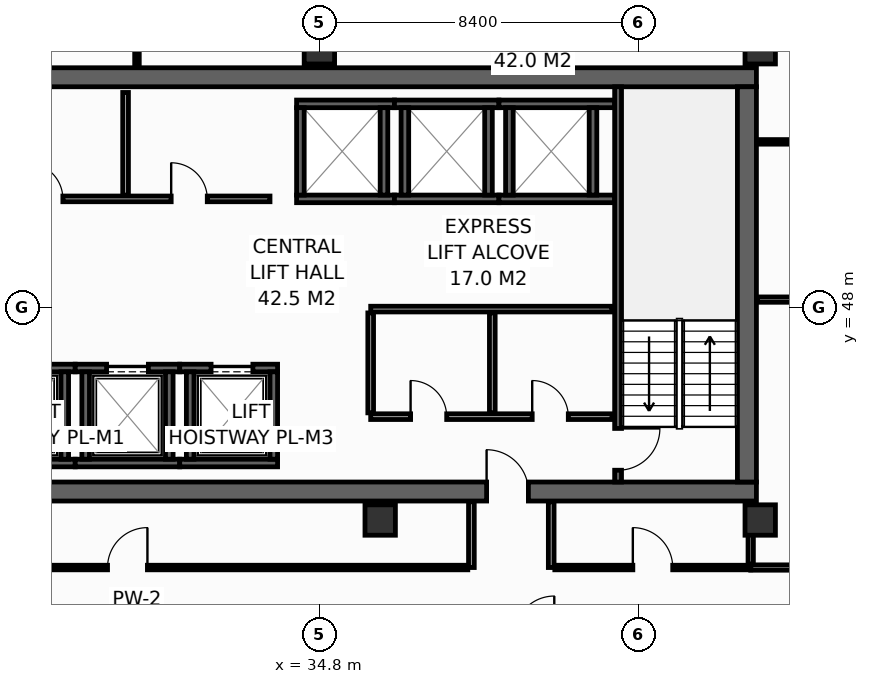
"""IFC4 building model, lengths in metres.
Left out: names, types, materials, properties, quantities, classifications, styles, units other than length and angle.
Written with IfcOpenShell. Run it as: python <this file> out.ifc"""

import sys

from ifc_helpers import new_model, si_unit, direction, frame, frame_2d, origin, origin_2d, place, context, subcontext, project, spatial, rectangle, hollow_rectangle, extrude, element, fill, save


model = new_model("IFC4")
c1 = context("Model", 3, precision=1e-05, world=origin(), true_north=direction((0.0, 1.0)))
c2 = subcontext(c1, "Body", "Model", "MODEL_VIEW")
j1 = project(units=[si_unit("LENGTHUNIT", "METRE"), si_unit("PLANEANGLEUNIT", "RADIAN")], contexts=[c1])
p1 = place(None, origin())
s1 = spatial("IfcSite", under=j1, at=p1, CompositionType="ELEMENT")
p2 = place(p1, origin())
s2 = spatial("IfcBuilding", under=s1, at=p2, CompositionType="ELEMENT")
p3 = place(p2, frame((0.0, 0.0, 198.0)))
s3 = spatial("IfcBuildingStorey", under=s2, at=p3, CompositionType="ELEMENT", Elevation=198.0)
p4 = place(p3, frame((13.6, 43.15, 0.0), z_axis=(0.0, 0.0, 1.0), x_axis=(1.0, 0.0, 0.0)))
e1 = element("IfcWall", 1, at=p4, inside=s3, PredefinedType="SHEAR", context=c2, shape_type="SweptSolid", body=[
    extrude(rectangle(XDim=32.7, YDim=0.5, at=frame_2d((16.35, 0.0))), origin(), (0.0, 0.0, 1.0), 3.55),
])
p5 = place(p4, frame((5.4, 0.0, 0.0)))
e2 = element("IfcOpeningElement", 2, at=p5, cuts=e1, PredefinedType="OPENING", context=c2, shape_type="SweptSolid", body=[
    extrude(rectangle(XDim=1.1, YDim=2.15, at=frame_2d((0.55, 1.075))), frame((0.0, 0.26, 0.0), z_axis=(0.0, -1.0, 0.0), x_axis=(1.0, 0.0, 0.0)), (0.0, 0.0, 1.0), 0.52),
])
p6 = place(p4, frame((25.6, 0.0, 0.0)))
e3 = element("IfcOpeningElement", 3, at=p6, cuts=e1, PredefinedType="OPENING", context=c2, shape_type="SweptSolid", body=[
    extrude(rectangle(XDim=1.1, YDim=2.15, at=frame_2d((0.55, 1.075))), frame((0.0, 0.26, 0.0), z_axis=(0.0, -1.0, 0.0), x_axis=(1.0, 0.0, 0.0)), (0.0, 0.0, 1.0), 0.52),
])
p7 = place(p3, frame((13.6, 54.05, 0.0), z_axis=(0.0, 0.0, 1.0), x_axis=(1.0, 0.0, 0.0)))
e4 = element("IfcWall", 4, at=p7, inside=s3, PredefinedType="SHEAR", context=c2, shape_type="SweptSolid", body=[
    extrude(rectangle(XDim=32.7, YDim=0.5, at=frame_2d((16.35, 0.0))), origin(), (0.0, 0.0, 1.0), 3.55),
])
p8 = place(p3, frame((46.05, 43.4, 0.0), z_axis=(0.0, 0.0, 1.0), x_axis=(0.0, 1.0, 0.0)))
e5 = element("IfcWall", 5, at=p8, inside=s3, PredefinedType="SHEAR", context=c2, shape_type="SweptSolid", body=[
    extrude(rectangle(XDim=10.4, YDim=0.5, at=frame_2d((5.2, 0.0))), origin(), (0.0, 0.0, 1.0), 3.55),
])
for number, where, z_axis, x_axis in (
    (6, (34.8, 54.8, 0.0), (0.0, 0.0, 1.0), (1.0, 0.0, 0.0)),
    (7, (46.4, 54.8, 0.0), (0.0, 0.0, 1.0), (1.0, 0.0, 0.0)),
    (8, (36.4, 42.4, 0.0), (0.0, 0.0, 1.0), (1.0, 0.0, 0.0)),
    (9, (46.4, 42.4, 0.0), (0.0, 0.0, 1.0), (1.0, 0.0, 0.0)),
):
    element("IfcColumn", number, at=place(p3, frame(where, z_axis=z_axis, x_axis=x_axis)), inside=s3, PredefinedType="COLUMN", context=c2, shape_type="SweptSolid", body=[
        extrude(hollow_rectangle(XDim=0.8, YDim=0.8, WallThickness=0.036, at=origin_2d()), origin(), (0.0, 0.0, 1.0), 3.8),
    ])
p9 = place(p3, frame((25.8, 43.9, 0.0), z_axis=(0.0, 0.0, 1.0), x_axis=(1.0, 0.0, 0.0)))
e10 = element("IfcWall", 10, at=p9, inside=s3, PredefinedType="SHEAR", context=c2, shape_type="SweptSolid", body=[
    extrude(rectangle(XDim=2.575, YDim=0.2, at=frame_2d((1.288, 0.0))), origin(), (0.0, 0.0, 1.0), 3.55),
])
p10 = place(p3, frame((25.8, 46.4, 0.0), z_axis=(0.0, 0.0, 1.0), x_axis=(1.0, 0.0, 0.0)))
e11 = element("IfcWall", 11, at=p10, inside=s3, PredefinedType="SHEAR", context=c2, shape_type="SweptSolid", body=[
    extrude(rectangle(XDim=2.575, YDim=0.2, at=frame_2d((1.288, 0.0))), origin(), (0.0, 0.0, 1.0), 3.55),
])
p11 = place(p10, frame((0.65, 0.0, 0.0)))
e12 = element("IfcOpeningElement", 12, at=p11, cuts=e11, PredefinedType="OPENING", context=c2, shape_type="SweptSolid", body=[
    extrude(rectangle(XDim=1.1, YDim=2.2, at=frame_2d((0.55, 1.1))), frame((0.0, 0.11, 0.0), z_axis=(0.0, -1.0, 0.0), x_axis=(1.0, 0.0, 0.0)), (0.0, 0.0, 1.0), 0.22),
])
p12 = place(p3, frame((28.1, 44.0, 0.0), z_axis=(0.0, 0.0, 1.0), x_axis=(0.0, 1.0, 0.0)))
e13 = element("IfcWall", 13, at=p12, inside=s3, PredefinedType="SHEAR", context=c2, shape_type="SweptSolid", body=[
    extrude(rectangle(XDim=2.3, YDim=0.2, at=frame_2d((1.15, 0.0))), origin(), (0.0, 0.0, 1.0), 3.55),
])
p13 = place(p3, frame((28.375, 43.9, 0.0), z_axis=(0.0, 0.0, 1.0), x_axis=(1.0, 0.0, 0.0)))
e14 = element("IfcWall", 14, at=p13, inside=s3, PredefinedType="SHEAR", context=c2, shape_type="SweptSolid", body=[
    extrude(rectangle(XDim=2.75, YDim=0.2, at=frame_2d((1.375, 0.0))), origin(), (0.0, 0.0, 1.0), 3.55),
])
p14 = place(p3, frame((28.375, 46.4, 0.0), z_axis=(0.0, 0.0, 1.0), x_axis=(1.0, 0.0, 0.0)))
e15 = element("IfcWall", 15, at=p14, inside=s3, PredefinedType="SHEAR", context=c2, shape_type="SweptSolid", body=[
    extrude(rectangle(XDim=2.75, YDim=0.2, at=frame_2d((1.375, 0.0))), origin(), (0.0, 0.0, 1.0), 3.55),
])
p15 = place(p14, frame((0.825, 0.0, 0.0)))
e16 = element("IfcOpeningElement", 16, at=p15, cuts=e15, PredefinedType="OPENING", context=c2, shape_type="SweptSolid", body=[
    extrude(rectangle(XDim=1.1, YDim=2.2, at=frame_2d((0.55, 1.1))), frame((0.0, 0.11, 0.0), z_axis=(0.0, -1.0, 0.0), x_axis=(1.0, 0.0, 0.0)), (0.0, 0.0, 1.0), 0.22),
])
for number, where, z_axis, x_axis in (
    (17, (28.65, 44.0, 0.0), (0.0, 0.0, 1.0), (0.0, 1.0, 0.0)),
    (18, (30.85, 44.0, 0.0), (0.0, 0.0, 1.0), (0.0, 1.0, 0.0)),
):
    element("IfcWall", number, at=place(p3, frame(where, z_axis=z_axis, x_axis=x_axis)), inside=s3, PredefinedType="SHEAR", context=c2, shape_type="SweptSolid", body=[
        extrude(rectangle(XDim=2.3, YDim=0.2, at=frame_2d((1.15, 0.0))), origin(), (0.0, 0.0, 1.0), 3.55),
    ])
p16 = place(p3, frame((31.125, 43.9, 0.0), z_axis=(0.0, 0.0, 1.0), x_axis=(1.0, 0.0, 0.0)))
e19 = element("IfcWall", 19, at=p16, inside=s3, PredefinedType="SHEAR", context=c2, shape_type="SweptSolid", body=[
    extrude(rectangle(XDim=2.575, YDim=0.2, at=frame_2d((1.288, 0.0))), origin(), (0.0, 0.0, 1.0), 3.55),
])
p17 = place(p3, frame((31.125, 46.4, 0.0), z_axis=(0.0, 0.0, 1.0), x_axis=(1.0, 0.0, 0.0)))
e20 = element("IfcWall", 20, at=p17, inside=s3, PredefinedType="SHEAR", context=c2, shape_type="SweptSolid", body=[
    extrude(rectangle(XDim=2.575, YDim=0.2, at=frame_2d((1.288, 0.0))), origin(), (0.0, 0.0, 1.0), 3.55),
])
p18 = place(p17, frame((0.825, 0.0, 0.0)))
e21 = element("IfcOpeningElement", 21, at=p18, cuts=e20, PredefinedType="OPENING", context=c2, shape_type="SweptSolid", body=[
    extrude(rectangle(XDim=1.1, YDim=2.2, at=frame_2d((0.55, 1.1))), frame((0.0, 0.11, 0.0), z_axis=(0.0, -1.0, 0.0), x_axis=(1.0, 0.0, 0.0)), (0.0, 0.0, 1.0), 0.22),
])
for number, where, z_axis, x_axis in (
    (22, (31.4, 44.0, 0.0), (0.0, 0.0, 1.0), (0.0, 1.0, 0.0)),
    (23, (33.6, 44.0, 0.0), (0.0, 0.0, 1.0), (0.0, 1.0, 0.0)),
):
    element("IfcWall", number, at=place(p3, frame(where, z_axis=z_axis, x_axis=x_axis)), inside=s3, PredefinedType="SHEAR", context=c2, shape_type="SweptSolid", body=[
        extrude(rectangle(XDim=2.3, YDim=0.2, at=frame_2d((1.15, 0.0))), origin(), (0.0, 0.0, 1.0), 3.55),
    ])
for number, where, z_axis, x_axis in (
    (24, (34.2, 50.85, 0.0), (0.0, 0.0, 1.0), (1.0, 0.0, 0.0)),
    (25, (34.2, 53.35, 0.0), (0.0, 0.0, 1.0), (1.0, 0.0, 0.0)),
):
    element("IfcWall", number, at=place(p3, frame(where, z_axis=z_axis, x_axis=x_axis)), inside=s3, PredefinedType="SHEAR", context=c2, shape_type="SweptSolid", body=[
        extrude(rectangle(XDim=2.575, YDim=0.2, at=frame_2d((1.288, 0.0))), origin(), (0.0, 0.0, 1.0), 3.55),
    ])
for number, where, z_axis, x_axis in (
    (26, (34.3, 50.95, 0.0), (0.0, 0.0, 1.0), (0.0, 1.0, 0.0)),
    (27, (36.5, 50.95, 0.0), (0.0, 0.0, 1.0), (0.0, 1.0, 0.0)),
):
    element("IfcWall", number, at=place(p3, frame(where, z_axis=z_axis, x_axis=x_axis)), inside=s3, PredefinedType="SHEAR", context=c2, shape_type="SweptSolid", body=[
        extrude(rectangle(XDim=2.3, YDim=0.2, at=frame_2d((1.15, 0.0))), origin(), (0.0, 0.0, 1.0), 3.55),
    ])
for number, where, z_axis, x_axis in (
    (28, (36.775, 50.85, 0.0), (0.0, 0.0, 1.0), (1.0, 0.0, 0.0)),
    (29, (36.775, 53.35, 0.0), (0.0, 0.0, 1.0), (1.0, 0.0, 0.0)),
):
    element("IfcWall", number, at=place(p3, frame(where, z_axis=z_axis, x_axis=x_axis)), inside=s3, PredefinedType="SHEAR", context=c2, shape_type="SweptSolid", body=[
        extrude(rectangle(XDim=2.75, YDim=0.2, at=frame_2d((1.375, 0.0))), origin(), (0.0, 0.0, 1.0), 3.55),
    ])
for number, where, z_axis, x_axis in (
    (30, (37.05, 50.95, 0.0), (0.0, 0.0, 1.0), (0.0, 1.0, 0.0)),
    (31, (39.25, 50.95, 0.0), (0.0, 0.0, 1.0), (0.0, 1.0, 0.0)),
):
    element("IfcWall", number, at=place(p3, frame(where, z_axis=z_axis, x_axis=x_axis)), inside=s3, PredefinedType="SHEAR", context=c2, shape_type="SweptSolid", body=[
        extrude(rectangle(XDim=2.3, YDim=0.2, at=frame_2d((1.15, 0.0))), origin(), (0.0, 0.0, 1.0), 3.55),
    ])
for number, where, z_axis, x_axis in (
    (32, (39.525, 50.85, 0.0), (0.0, 0.0, 1.0), (1.0, 0.0, 0.0)),
    (33, (39.525, 53.35, 0.0), (0.0, 0.0, 1.0), (1.0, 0.0, 0.0)),
):
    element("IfcWall", number, at=place(p3, frame(where, z_axis=z_axis, x_axis=x_axis)), inside=s3, PredefinedType="SHEAR", context=c2, shape_type="SweptSolid", body=[
        extrude(rectangle(XDim=3.045, YDim=0.2, at=frame_2d((1.522, 0.0))), origin(), (0.0, 0.0, 1.0), 3.55),
    ])
for number, where, z_axis, x_axis in (
    (34, (39.8, 50.95, 0.0), (0.0, 0.0, 1.0), (0.0, 1.0, 0.0)),
    (35, (42.0, 50.95, 0.0), (0.0, 0.0, 1.0), (0.0, 1.0, 0.0)),
):
    element("IfcWall", number, at=place(p3, frame(where, z_axis=z_axis, x_axis=x_axis)), inside=s3, PredefinedType="SHEAR", context=c2, shape_type="SweptSolid", body=[
        extrude(rectangle(XDim=2.3, YDim=0.2, at=frame_2d((1.15, 0.0))), origin(), (0.0, 0.0, 1.0), 3.55),
    ])
p19 = place(p3, frame((42.66, 53.8, 0.0), z_axis=(0.0, 0.0, 1.0), x_axis=(0.0, -1.0, 0.0)))
e36 = element("IfcWall", 36, at=p19, inside=s3, PredefinedType="SHEAR", context=c2, shape_type="SweptSolid", body=[
    extrude(rectangle(XDim=10.4, YDim=0.18, at=frame_2d((5.2, 0.0))), origin(), (0.0, 0.0, 1.0), 3.55),
])
p20 = place(p19, frame((8.99, 0.0, 0.0)))
e37 = element("IfcOpeningElement", 37, at=p20, cuts=e36, PredefinedType="OPENING", context=c2, shape_type="SweptSolid", body=[
    extrude(rectangle(XDim=1.1, YDim=2.15, at=frame_2d((0.55, 1.075))), frame((0.0, 0.1, 0.0), z_axis=(0.0, -1.0, 0.0), x_axis=(1.0, 0.0, 0.0)), (0.0, 0.0, 1.0), 0.2),
])
p21 = place(p3, frame((36.15, 45.12, 0.0), z_axis=(0.0, 0.0, 1.0), x_axis=(1.0, 0.0, 0.0)))
e38 = element("IfcWall", 38, at=p21, inside=s3, PredefinedType="PARTITIONING", context=c2, shape_type="SweptSolid", body=[
    extrude(rectangle(XDim=6.35, YDim=0.15, at=frame_2d((3.175, 0.0))), origin(), (0.0, 0.0, 1.0), 3.55),
])
p22 = place(p21, frame((1.05, 0.0, 0.0)))
e39 = element("IfcOpeningElement", 39, at=p22, cuts=e38, PredefinedType="OPENING", context=c2, shape_type="SweptSolid", body=[
    extrude(rectangle(XDim=0.95, YDim=2.15, at=frame_2d((0.475, 1.075))), frame((0.0, 0.085, 0.0), z_axis=(0.0, -1.0, 0.0), x_axis=(1.0, 0.0, 0.0)), (0.0, 0.0, 1.0), 0.17),
])
p23 = place(p21, frame((4.25, 0.0, 0.0)))
e40 = element("IfcOpeningElement", 40, at=p23, cuts=e38, PredefinedType="OPENING", context=c2, shape_type="SweptSolid", body=[
    extrude(rectangle(XDim=0.95, YDim=2.15, at=frame_2d((0.475, 1.075))), frame((0.0, 0.085, 0.0), z_axis=(0.0, -1.0, 0.0), x_axis=(1.0, 0.0, 0.0)), (0.0, 0.0, 1.0), 0.17),
])
p24 = place(p3, frame((36.15, 47.95, 0.0), z_axis=(0.0, 0.0, 1.0), x_axis=(1.0, 0.0, 0.0)))
e41 = element("IfcWall", 41, at=p24, inside=s3, PredefinedType="PARTITIONING", context=c2, shape_type="SweptSolid", body=[
    extrude(rectangle(XDim=6.35, YDim=0.15, at=frame_2d((3.175, 0.0))), origin(), (0.0, 0.0, 1.0), 3.55),
])
for number, where, z_axis, x_axis in (
    (42, (36.15, 45.22, 0.0), (0.0, 0.0, 1.0), (0.0, 1.0, 0.0)),
    (43, (39.35, 45.22, 0.0), (0.0, 0.0, 1.0), (0.0, 1.0, 0.0)),
):
    element("IfcWall", number, at=place(p3, frame(where, z_axis=z_axis, x_axis=x_axis)), inside=s3, PredefinedType="PARTITIONING", context=c2, shape_type="SweptSolid", body=[
        extrude(rectangle(XDim=2.63, YDim=0.15, at=frame_2d((1.315, 0.0))), origin(), (0.0, 0.0, 1.0), 3.55),
    ])
p25 = place(p3, frame((25.85, 50.85, 0.0), z_axis=(0.0, 0.0, 1.0), x_axis=(1.0, 0.0, 0.0)))
e44 = element("IfcWall", 44, at=p25, inside=s3, PredefinedType="PARTITIONING", context=c2, shape_type="SweptSolid", body=[
    extrude(rectangle(XDim=7.65, YDim=0.15, at=frame_2d((3.825, 0.0))), origin(), (0.0, 0.0, 1.0), 3.55),
])
p26 = place(p25, frame((1.25, 0.0, 0.0)))
e45 = element("IfcOpeningElement", 45, at=p26, cuts=e44, PredefinedType="OPENING", context=c2, shape_type="SweptSolid", body=[
    extrude(rectangle(XDim=0.95, YDim=2.15, at=frame_2d((0.475, 1.075))), frame((0.0, 0.085, 0.0), z_axis=(0.0, -1.0, 0.0), x_axis=(1.0, 0.0, 0.0)), (0.0, 0.0, 1.0), 0.17),
])
p27 = place(p25, frame((5.05, 0.0, 0.0)))
e46 = element("IfcOpeningElement", 46, at=p27, cuts=e44, PredefinedType="OPENING", context=c2, shape_type="SweptSolid", body=[
    extrude(rectangle(XDim=0.95, YDim=2.15, at=frame_2d((0.475, 1.075))), frame((0.0, 0.085, 0.0), z_axis=(0.0, -1.0, 0.0), x_axis=(1.0, 0.0, 0.0)), (0.0, 0.0, 1.0), 0.17),
])
p28 = place(p3, frame((29.7, 50.95, 0.0), z_axis=(0.0, 0.0, 1.0), x_axis=(0.0, 1.0, 0.0)))
e47 = element("IfcWall", 47, at=p28, inside=s3, PredefinedType="PARTITIONING", context=c2, shape_type="SweptSolid", body=[
    extrude(rectangle(XDim=2.7, YDim=0.15, at=frame_2d((1.35, 0.0))), origin(), (0.0, 0.0, 1.0), 3.55),
])
p29 = place(p3, frame((46.15, 41.15, 0.0), z_axis=(0.0, 0.0, 1.0), x_axis=(1.0, 0.0, 0.0)))
e48 = element("IfcWall", 48, at=p29, inside=s3, PredefinedType="PARTITIONING", context=c2, shape_type="SweptSolid", body=[
    extrude(rectangle(XDim=4.05, YDim=0.14, at=frame_2d((2.025, 0.0))), origin(), (0.0, 0.0, 1.0), 3.55),
])
p30 = place(p3, frame((46.15, 41.24, 0.0), z_axis=(0.0, 0.0, 1.0), x_axis=(0.0, 1.0, 0.0)))
e49 = element("IfcWall", 49, at=p30, inside=s3, PredefinedType="PARTITIONING", context=c2, shape_type="SweptSolid", body=[
    extrude(rectangle(XDim=1.64, YDim=0.14, at=frame_2d((0.82, 0.0))), origin(), (0.0, 0.0, 1.0), 3.55),
])
p31 = place(p3, frame((46.32, 48.2, 0.0), z_axis=(0.0, 0.0, 1.0), x_axis=(1.0, 0.0, 0.0)))
e50 = element("IfcWall", 50, at=p31, inside=s3, PredefinedType="PARTITIONING", context=c2, shape_type="SweptSolid", body=[
    extrude(rectangle(XDim=3.88, YDim=0.14, at=frame_2d((1.94, 0.0))), origin(), (0.0, 0.0, 1.0), 3.55),
])
p32 = place(p3, frame((46.32, 52.35, 0.0), z_axis=(0.0, 0.0, 1.0), x_axis=(1.0, 0.0, 0.0)))
e51 = element("IfcWall", 51, at=p32, inside=s3, PredefinedType="PARTITIONING", context=c2, shape_type="SweptSolid", body=[
    extrude(rectangle(XDim=3.88, YDim=0.12, at=frame_2d((1.94, 0.0))), origin(), (0.0, 0.0, 1.0), 3.55),
])
p33 = place(p3, frame((30.0, 54.32, 0.0), z_axis=(0.0, 0.0, 1.0), x_axis=(0.0, 1.0, 0.0)))
e52 = element("IfcWall", 52, at=p33, inside=s3, PredefinedType="PARTITIONING", context=c2, shape_type="SweptSolid", body=[
    extrude(rectangle(XDim=1.675, YDim=0.12, at=frame_2d((0.837, 0.0))), origin(), (0.0, 0.0, 1.0), 2.935),
])
for number, where, z_axis, x_axis in (
    (53, (38.8, 41.15, 0.0), (0.0, 0.0, 1.0), (0.0, 1.0, 0.0)),
    (54, (40.9, 41.15, 0.0), (0.0, 0.0, 1.0), (0.0, 1.0, 0.0)),
):
    element("IfcWall", number, at=place(p3, frame(where, z_axis=z_axis, x_axis=x_axis)), inside=s3, PredefinedType="PARTITIONING", context=c2, shape_type="SweptSolid", body=[
        extrude(rectangle(XDim=1.73, YDim=0.15, at=frame_2d((0.865, 0.0))), origin(), (0.0, 0.0, 1.0), 3.55),
    ])
p34 = place(p3, frame((20.795, 41.15, 0.0), z_axis=(0.0, 0.0, 1.0), x_axis=(1.0, 0.0, 0.0)))
e55 = element("IfcWall", 55, at=p34, inside=s3, PredefinedType="PARTITIONING", context=c2, shape_type="SweptSolid", body=[
    extrude(rectangle(XDim=17.91, YDim=0.12, at=frame_2d((8.955, 0.0))), origin(), (0.0, 0.0, 1.0), 2.835),
])
p35 = place(p34, frame((8.43, 0.0, 0.0)))
e56 = element("IfcOpeningElement", 56, at=p35, cuts=e55, PredefinedType="OPENING", context=c2, shape_type="SweptSolid", body=[
    extrude(rectangle(XDim=1.05, YDim=2.15, at=frame_2d((0.525, 1.075))), frame((0.0, 0.07, 0.0), z_axis=(0.0, -1.0, 0.0), x_axis=(1.0, 0.0, 0.0)), (0.0, 0.0, 1.0), 0.14),
])
p36 = place(p3, frame((40.995, 41.15, 0.0), z_axis=(0.0, 0.0, 1.0), x_axis=(1.0, 0.0, 0.0)))
e57 = element("IfcWall", 57, at=p36, inside=s3, PredefinedType="PARTITIONING", context=c2, shape_type="SweptSolid", body=[
    extrude(rectangle(XDim=5.155, YDim=0.12, at=frame_2d((2.577, 0.0))), origin(), (0.0, 0.0, 1.0), 3.55),
])
p37 = place(p36, frame((2.053, 0.0, 0.0)))
e58 = element("IfcOpeningElement", 58, at=p37, cuts=e57, PredefinedType="OPENING", context=c2, shape_type="SweptSolid", body=[
    extrude(rectangle(XDim=1.05, YDim=2.15, at=frame_2d((0.525, 1.075))), frame((0.0, 0.07, 0.0), z_axis=(0.0, -1.0, 0.0), x_axis=(1.0, 0.0, 0.0)), (0.0, 0.0, 1.0), 0.14),
])
p38 = place(p15, origin())
e59 = element("IfcDoor", 59, at=p38, inside=s3, OperationType="SLIDING_TO_LEFT", PredefinedType="DOOR", context=c2, shape_type="SweptSolid", body=[
    extrude(rectangle(XDim=1.1, YDim=2.2, at=frame_2d((0.55, 1.1))), frame((0.0, 0.025, 0.0), z_axis=(0.0, -1.0, 0.0), x_axis=(1.0, 0.0, 0.0)), (0.0, 0.0, 1.0), 0.05),
])
fill(e16, e59)
p39 = place(p18, origin())
e60 = element("IfcDoor", 60, at=p39, inside=s3, OperationType="SLIDING_TO_LEFT", PredefinedType="DOOR", context=c2, shape_type="SweptSolid", body=[
    extrude(rectangle(XDim=1.1, YDim=2.2, at=frame_2d((0.55, 1.1))), frame((0.0, 0.025, 0.0), z_axis=(0.0, -1.0, 0.0), x_axis=(1.0, 0.0, 0.0)), (0.0, 0.0, 1.0), 0.05),
])
fill(e21, e60)
p40 = place(p20, origin())
e61 = element("IfcDoor", 61, at=p40, inside=s3, OperationType="SINGLE_SWING_LEFT", PredefinedType="DOOR", context=c2, shape_type="SweptSolid", body=[
    extrude(rectangle(XDim=1.1, YDim=2.15, at=frame_2d((0.55, 1.075))), frame((0.0, 0.025, 0.0), z_axis=(0.0, -1.0, 0.0), x_axis=(1.0, 0.0, 0.0)), (0.0, 0.0, 1.0), 0.05),
])
fill(e37, e61)
p41 = place(p6, origin())
e62 = element("IfcDoor", 62, at=p41, inside=s3, OperationType="SINGLE_SWING_LEFT", PredefinedType="DOOR", context=c2, shape_type="SweptSolid", body=[
    extrude(rectangle(XDim=1.1, YDim=2.15, at=frame_2d((0.55, 1.075))), frame((0.0, 0.025, 0.0), z_axis=(0.0, -1.0, 0.0), x_axis=(1.0, 0.0, 0.0)), (0.0, 0.0, 1.0), 0.05),
])
fill(e3, e62)
p42 = place(p22, origin())
e63 = element("IfcDoor", 63, at=p42, inside=s3, OperationType="SINGLE_SWING_LEFT", PredefinedType="DOOR", context=c2, shape_type="SweptSolid", body=[
    extrude(rectangle(XDim=0.95, YDim=2.15, at=frame_2d((0.475, 1.075))), frame((0.0, 0.025, 0.0), z_axis=(0.0, -1.0, 0.0), x_axis=(1.0, 0.0, 0.0)), (0.0, 0.0, 1.0), 0.05),
])
fill(e39, e63)
p43 = place(p23, origin())
e64 = element("IfcDoor", 64, at=p43, inside=s3, OperationType="SINGLE_SWING_LEFT", PredefinedType="DOOR", context=c2, shape_type="SweptSolid", body=[
    extrude(rectangle(XDim=0.95, YDim=2.15, at=frame_2d((0.475, 1.075))), frame((0.0, 0.025, 0.0), z_axis=(0.0, -1.0, 0.0), x_axis=(1.0, 0.0, 0.0)), (0.0, 0.0, 1.0), 0.05),
])
fill(e40, e64)
p44 = place(p26, origin())
e65 = element("IfcDoor", 65, at=p44, inside=s3, OperationType="SINGLE_SWING_LEFT", PredefinedType="DOOR", context=c2, shape_type="SweptSolid", body=[
    extrude(rectangle(XDim=0.95, YDim=2.15, at=frame_2d((0.475, 1.075))), frame((0.0, 0.025, 0.0), z_axis=(0.0, -1.0, 0.0), x_axis=(1.0, 0.0, 0.0)), (0.0, 0.0, 1.0), 0.05),
])
fill(e45, e65)
p45 = place(p27, origin())
e66 = element("IfcDoor", 66, at=p45, inside=s3, OperationType="SINGLE_SWING_LEFT", PredefinedType="DOOR", context=c2, shape_type="SweptSolid", body=[
    extrude(rectangle(XDim=0.95, YDim=2.15, at=frame_2d((0.475, 1.075))), frame((0.0, 0.025, 0.0), z_axis=(0.0, -1.0, 0.0), x_axis=(1.0, 0.0, 0.0)), (0.0, 0.0, 1.0), 0.05),
])
fill(e46, e66)
p46 = place(p35, origin())
e67 = element("IfcDoor", 67, at=p46, inside=s3, OperationType="SINGLE_SWING_RIGHT", PredefinedType="DOOR", context=c2, shape_type="SweptSolid", body=[
    extrude(rectangle(XDim=1.05, YDim=2.15, at=frame_2d((0.525, 1.075))), frame((0.0, 0.025, 0.0), z_axis=(0.0, -1.0, 0.0), x_axis=(1.0, 0.0, 0.0)), (0.0, 0.0, 1.0), 0.05),
])
fill(e56, e67)
p47 = place(p37, origin())
e68 = element("IfcDoor", 68, at=p47, inside=s3, OperationType="SINGLE_SWING_LEFT", PredefinedType="DOOR", context=c2, shape_type="SweptSolid", body=[
    extrude(rectangle(XDim=1.05, YDim=2.15, at=frame_2d((0.525, 1.075))), frame((0.0, 0.025, 0.0), z_axis=(0.0, -1.0, 0.0), x_axis=(1.0, 0.0, 0.0)), (0.0, 0.0, 1.0), 0.05),
])
fill(e58, e68)
save(model, sys.argv[1])
